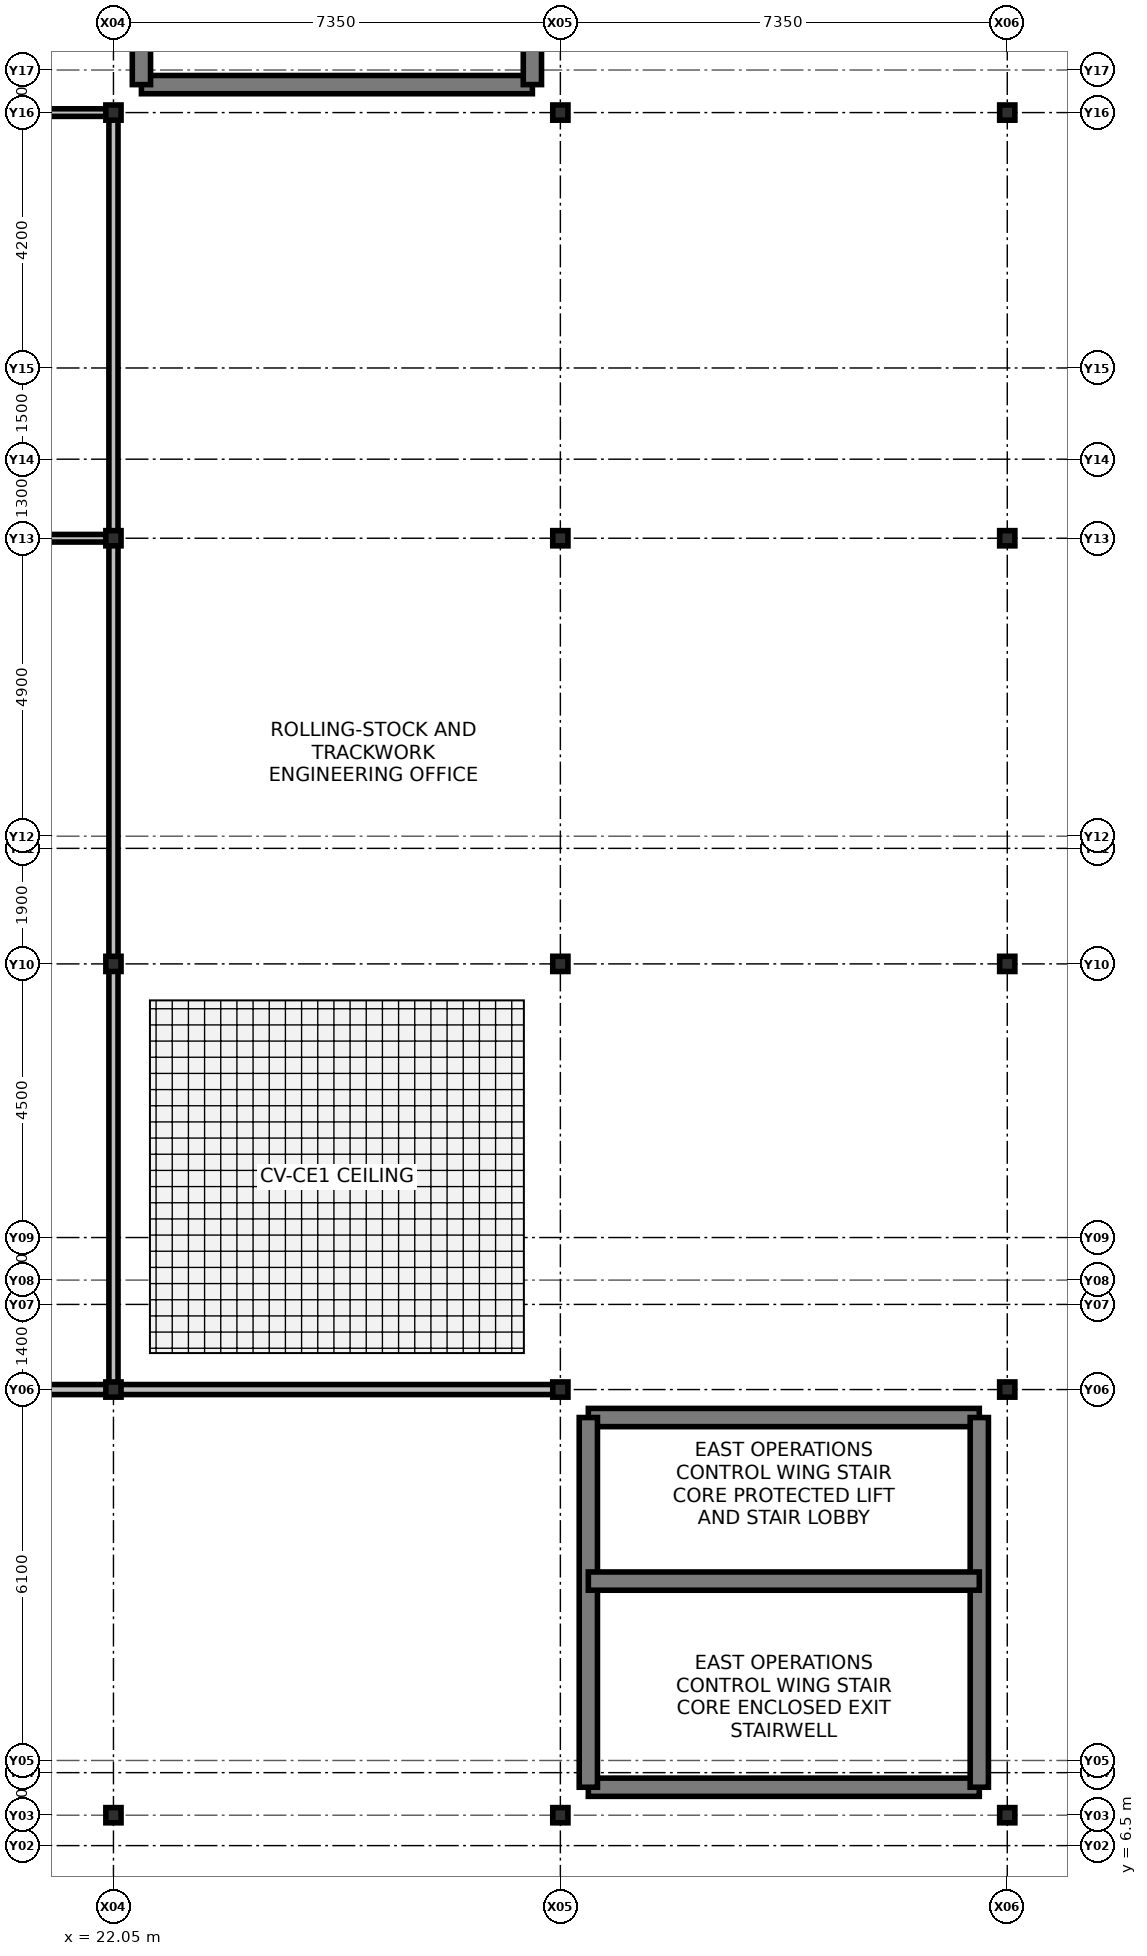
"""IFC4 building model, lengths in metres.
Left out: names, types, materials, properties, quantities, classifications, styles, units other than length and angle.
Written with IfcOpenShell. Run it as: python <this file> out.ifc"""

import sys

from ifc_helpers import new_model, si_unit, direction, frame, frame_2d, origin, origin_2d, place, context, subcontext, project, spatial, rectangle, i_section, extrude, element, fill, save


model = new_model("IFC4")
c1 = context("Model", 3, precision=1e-05, world=origin(), true_north=direction((0.0, 1.0)))
c2 = subcontext(c1, "Body", "Model", "MODEL_VIEW")
j1 = project(units=[si_unit("LENGTHUNIT", "METRE"), si_unit("PLANEANGLEUNIT", "RADIAN")], contexts=[c1])
p1 = place(None, origin())
s1 = spatial("IfcSite", under=j1, at=p1, CompositionType="ELEMENT")
p2 = place(p1, origin())
s2 = spatial("IfcBuilding", under=s1, at=p2, CompositionType="ELEMENT")
p3 = place(p2, frame((0.0, 0.0, 15.3)))
s3 = spatial("IfcBuildingStorey", under=s2, at=p3, CompositionType="ELEMENT", Elevation=15.3)
for number, where, z_axis, x_axis in (
    (1, (22.05, 7.0, 0.0), (0.0, 0.0, 1.0), (1.0, 0.0, 0.0)),
    (2, (22.05, 14.0, 0.0), (0.0, 0.0, 1.0), (1.0, 0.0, 0.0)),
    (3, (22.05, 21.0, 0.0), (0.0, 0.0, 1.0), (1.0, 0.0, 0.0)),
    (4, (22.05, 28.0, 0.0), (0.0, 0.0, 1.0), (1.0, 0.0, 0.0)),
    (5, (22.05, 35.0, 0.0), (0.0, 0.0, 1.0), (1.0, 0.0, 0.0)),
    (6, (29.4, 7.0, 0.0), (0.0, 0.0, 1.0), (1.0, 0.0, 0.0)),
    (7, (29.4, 14.0, 0.0), (0.0, 0.0, 1.0), (1.0, 0.0, 0.0)),
    (8, (29.4, 21.0, 0.0), (0.0, 0.0, 1.0), (1.0, 0.0, 0.0)),
    (9, (29.4, 28.0, 0.0), (0.0, 0.0, 1.0), (1.0, 0.0, 0.0)),
    (10, (29.4, 35.0, 0.0), (0.0, 0.0, 1.0), (1.0, 0.0, 0.0)),
    (11, (36.75, 7.0, 0.0), (0.0, 0.0, 1.0), (1.0, 0.0, 0.0)),
    (12, (36.75, 14.0, 0.0), (0.0, 0.0, 1.0), (1.0, 0.0, 0.0)),
    (13, (36.75, 21.0, 0.0), (0.0, 0.0, 1.0), (1.0, 0.0, 0.0)),
    (14, (36.75, 28.0, 0.0), (0.0, 0.0, 1.0), (1.0, 0.0, 0.0)),
    (15, (36.75, 35.0, 0.0), (0.0, 0.0, 1.0), (1.0, 0.0, 0.0)),
):
    element("IfcColumn", number, at=place(p3, frame(where, z_axis=z_axis, x_axis=x_axis)), inside=s3, PredefinedType="COLUMN", context=c2, shape_type="SweptSolid", body=[
        extrude(i_section(OverallWidth=0.25, OverallDepth=0.25, WebThickness=0.009, FlangeThickness=0.014, at=origin_2d()), origin(), (0.0, 0.0, 1.0), 4.2),
    ])
p4 = place(p3, frame((22.51, 35.46, 0.0), z_axis=(0.0, 0.0, 1.0), x_axis=(1.0, 0.0, 0.0)))
e16 = element("IfcWall", 16, at=p4, inside=s3, PredefinedType="SHEAR", context=c2, shape_type="SweptSolid", body=[
    extrude(rectangle(XDim=6.43, YDim=0.3, at=frame_2d((3.215, 0.0))), origin(), (0.0, 0.0, 1.0), 3.92),
])
for number, where, z_axis, x_axis in (
    (17, (22.51, 35.46, 0.0), (0.0, 0.0, 1.0), (0.0, 1.0, 0.0)),
    (18, (28.94, 35.46, 0.0), (0.0, 0.0, 1.0), (0.0, 1.0, 0.0)),
):
    element("IfcWall", number, at=place(p3, frame(where, z_axis=z_axis, x_axis=x_axis)), inside=s3, PredefinedType="SHEAR", context=c2, shape_type="SweptSolid", body=[
        extrude(rectangle(XDim=6.08, YDim=0.3, at=frame_2d((3.04, 0.0))), origin(), (0.0, 0.0, 1.0), 3.92),
    ])
p5 = place(p3, frame((29.86, 7.46, 0.0), z_axis=(0.0, 0.0, 1.0), x_axis=(1.0, 0.0, 0.0)))
e19 = element("IfcWall", 19, at=p5, inside=s3, PredefinedType="SHEAR", context=c2, shape_type="SweptSolid", body=[
    extrude(rectangle(XDim=6.43, YDim=0.3, at=frame_2d((3.215, 0.0))), origin(), (0.0, 0.0, 1.0), 3.92),
])
p6 = place(p3, frame((29.86, 13.54, 0.0), z_axis=(0.0, 0.0, 1.0), x_axis=(1.0, 0.0, 0.0)))
e20 = element("IfcWall", 20, at=p6, inside=s3, PredefinedType="SHEAR", context=c2, shape_type="SweptSolid", body=[
    extrude(rectangle(XDim=6.43, YDim=0.3, at=frame_2d((3.215, 0.0))), origin(), (0.0, 0.0, 1.0), 3.92),
])
p7 = place(p6, frame((0.55, 0.0, 0.0)))
e21 = element("IfcOpeningElement", 21, at=p7, cuts=e20, PredefinedType="OPENING", context=c2, shape_type="SweptSolid", body=[
    extrude(rectangle(XDim=1.5, YDim=2.2, at=frame_2d((0.75, 1.1))), frame((0.0, 0.16, 0.0), z_axis=(0.0, -1.0, 0.0), x_axis=(1.0, 0.0, 0.0)), (0.0, 0.0, 1.0), 0.32),
])
for number, where, z_axis, x_axis in (
    (22, (29.86, 7.46, 0.0), (0.0, 0.0, 1.0), (0.0, 1.0, 0.0)),
    (23, (36.29, 7.46, 0.0), (0.0, 0.0, 1.0), (0.0, 1.0, 0.0)),
):
    element("IfcWall", number, at=place(p3, frame(where, z_axis=z_axis, x_axis=x_axis)), inside=s3, PredefinedType="SHEAR", context=c2, shape_type="SweptSolid", body=[
        extrude(rectangle(XDim=6.08, YDim=0.3, at=frame_2d((3.04, 0.0))), origin(), (0.0, 0.0, 1.0), 3.92),
    ])
p8 = place(p3, frame((29.86, 10.85, 0.0), z_axis=(0.0, 0.0, 1.0), x_axis=(1.0, 0.0, 0.0)))
e24 = element("IfcWall", 24, at=p8, inside=s3, PredefinedType="SHEAR", context=c2, shape_type="SweptSolid", body=[
    extrude(rectangle(XDim=6.43, YDim=0.3, at=frame_2d((3.215, 0.0))), origin(), (0.0, 0.0, 1.0), 3.92),
])
p9 = place(p8, frame((0.185, 0.0, 0.0)))
e25 = element("IfcOpeningElement", 25, at=p9, cuts=e24, PredefinedType="OPENING", context=c2, shape_type="SweptSolid", body=[
    extrude(rectangle(XDim=1.05, YDim=2.15, at=frame_2d((0.525, 1.075))), frame((0.0, 0.16, 0.0), z_axis=(0.0, -1.0, 0.0), x_axis=(1.0, 0.0, 0.0)), (0.0, 0.0, 1.0), 0.32),
])
p10 = place(p3, frame((7.35, 14.0, 0.0), z_axis=(0.0, 0.0, 1.0), x_axis=(1.0, 0.0, 0.0)))
e26 = element("IfcWall", 26, at=p10, inside=s3, PredefinedType="PARTITIONING", context=c2, shape_type="SweptSolid", body=[
    extrude(rectangle(XDim=22.05, YDim=0.165, at=frame_2d((11.025, 0.0))), origin(), (0.0, 0.0, 1.0), 3.2),
])
p11 = place(p10, frame((4.0, 0.0, 0.0)))
e27 = element("IfcOpeningElement", 27, at=p11, cuts=e26, PredefinedType="OPENING", context=c2, shape_type="SweptSolid", body=[
    extrude(rectangle(XDim=1.7, YDim=2.25, at=frame_2d((0.85, 1.125))), frame((0.0, 0.092, 0.0), z_axis=(0.0, -1.0, 0.0), x_axis=(1.0, 0.0, 0.0)), (0.0, 0.0, 1.0), 0.185),
])
p12 = place(p3, frame((22.05, 14.0, 0.0), z_axis=(0.0, 0.0, 1.0), x_axis=(0.0, 1.0, 0.0)))
e28 = element("IfcWall", 28, at=p12, inside=s3, PredefinedType="PARTITIONING", context=c2, shape_type="SweptSolid", body=[
    extrude(rectangle(XDim=21.0, YDim=0.15, at=frame_2d((10.5, 0.0))), origin(), (0.0, 0.0, 1.0), 3.2),
])
p13 = place(p12, frame((4.0, 0.0, 0.0)))
e29 = element("IfcOpeningElement", 29, at=p13, cuts=e28, PredefinedType="OPENING", context=c2, shape_type="SweptSolid", body=[
    extrude(rectangle(XDim=1.25, YDim=2.15, at=frame_2d((0.625, 1.075))), frame((0.0, 0.085, 0.0), z_axis=(0.0, -1.0, 0.0), x_axis=(1.0, 0.0, 0.0)), (0.0, 0.0, 1.0), 0.17),
])
p14 = place(p12, frame((17.5, 0.0, 0.0)))
e30 = element("IfcOpeningElement", 30, at=p14, cuts=e28, PredefinedType="OPENING", context=c2, shape_type="SweptSolid", body=[
    extrude(rectangle(XDim=1.15, YDim=2.15, at=frame_2d((0.575, 1.075))), frame((0.0, 0.085, 0.0), z_axis=(0.0, -1.0, 0.0), x_axis=(1.0, 0.0, 0.0)), (0.0, 0.0, 1.0), 0.17),
])
p15 = place(p3, frame((7.35, 28.0, 0.0), z_axis=(0.0, 0.0, 1.0), x_axis=(1.0, 0.0, 0.0)))
e31 = element("IfcWall", 31, at=p15, inside=s3, PredefinedType="PARTITIONING", context=c2, shape_type="SweptSolid", body=[
    extrude(rectangle(XDim=14.7, YDim=0.125, at=frame_2d((7.35, 0.0))), origin(), (0.0, 0.0, 1.0), 3.2),
])
p16 = place(p15, frame((4.0, 0.0, 0.0)))
e32 = element("IfcOpeningElement", 32, at=p16, cuts=e31, PredefinedType="OPENING", context=c2, shape_type="SweptSolid", body=[
    extrude(rectangle(XDim=1.35, YDim=2.2, at=frame_2d((0.675, 1.1))), frame((0.0, 0.072, 0.0), z_axis=(0.0, -1.0, 0.0), x_axis=(1.0, 0.0, 0.0)), (0.0, 0.0, 1.0), 0.145),
])
p17 = place(p3, frame((7.35, 35.0, 0.0), z_axis=(0.0, 0.0, 1.0), x_axis=(1.0, 0.0, 0.0)))
e33 = element("IfcWall", 33, at=p17, inside=s3, PredefinedType="PARTITIONING", context=c2, shape_type="SweptSolid", body=[
    extrude(rectangle(XDim=14.7, YDim=0.125, at=frame_2d((7.35, 0.0))), origin(), (0.0, 0.0, 1.0), 3.2),
])
p18 = place(p17, frame((4.0, 0.0, 0.0)))
e34 = element("IfcOpeningElement", 34, at=p18, cuts=e33, PredefinedType="OPENING", context=c2, shape_type="SweptSolid", body=[
    extrude(rectangle(XDim=1.1, YDim=2.1, at=frame_2d((0.55, 1.05))), frame((0.0, 0.072, 0.0), z_axis=(0.0, -1.0, 0.0), x_axis=(1.0, 0.0, 0.0)), (0.0, 0.0, 1.0), 0.145),
])
p19 = place(p9, origin())
e35 = element("IfcDoor", 35, at=p19, inside=s3, OperationType="SINGLE_SWING_RIGHT", PredefinedType="DOOR", context=c2, shape_type="SweptSolid", body=[
    extrude(rectangle(XDim=1.05, YDim=2.15, at=frame_2d((0.525, 1.075))), frame((0.0, 0.025, 0.0), z_axis=(0.0, -1.0, 0.0), x_axis=(1.0, 0.0, 0.0)), (0.0, 0.0, 1.0), 0.05),
])
fill(e25, e35)
p20 = place(p7, origin())
e36 = element("IfcDoor", 36, at=p20, inside=s3, OperationType="DOUBLE_DOOR_SINGLE_SWING", PredefinedType="DOOR", context=c2, shape_type="SweptSolid", body=[
    extrude(rectangle(XDim=1.5, YDim=2.2, at=frame_2d((0.75, 1.1))), frame((0.0, 0.025, 0.0), z_axis=(0.0, -1.0, 0.0), x_axis=(1.0, 0.0, 0.0)), (0.0, 0.0, 1.0), 0.05),
])
fill(e21, e36)
p21 = place(p13, origin())
e37 = element("IfcDoor", 37, at=p21, inside=s3, OperationType="SINGLE_SWING_LEFT", PredefinedType="DOOR", context=c2, shape_type="SweptSolid", body=[
    extrude(rectangle(XDim=1.25, YDim=2.15, at=frame_2d((0.625, 1.075))), frame((0.0, 0.025, 0.0), z_axis=(0.0, -1.0, 0.0), x_axis=(1.0, 0.0, 0.0)), (0.0, 0.0, 1.0), 0.05),
])
fill(e29, e37)
p22 = place(p14, origin())
e38 = element("IfcDoor", 38, at=p22, inside=s3, OperationType="SINGLE_SWING_RIGHT", PredefinedType="DOOR", context=c2, shape_type="SweptSolid", body=[
    extrude(rectangle(XDim=1.15, YDim=2.15, at=frame_2d((0.575, 1.075))), frame((0.0, 0.025, 0.0), z_axis=(0.0, -1.0, 0.0), x_axis=(1.0, 0.0, 0.0)), (0.0, 0.0, 1.0), 0.05),
])
fill(e30, e38)
save(model, sys.argv[1])
